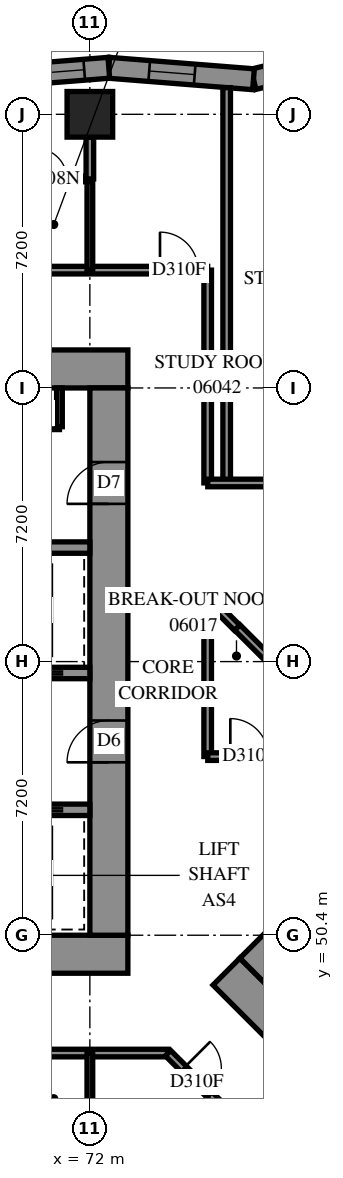
"""IFC4 building model, lengths in metres.
Left out: names, types, materials, properties, quantities, classifications, styles, units other than length and angle.
Written with IfcOpenShell. Run it as: python <this file> out.ifc"""

import sys

from ifc_helpers import new_model, si_unit, direction, frame, frame_2d, origin, origin_2d, place, context, subcontext, project, spatial, polyline, rectangle, outline, extrude, element, fill, save


model = new_model("IFC4")
c1 = context("Model", 3, precision=1e-05, world=origin(), true_north=direction((0.0, 1.0)))
c2 = subcontext(c1, "Body", "Model", "MODEL_VIEW")
j1 = project(units=[si_unit("LENGTHUNIT", "METRE"), si_unit("PLANEANGLEUNIT", "RADIAN")], contexts=[c1])
p1 = place(None, origin())
s1 = spatial("IfcSite", under=j1, at=p1, CompositionType="ELEMENT")
p2 = place(p1, origin())
s2 = spatial("IfcBuilding", under=s1, at=p2, CompositionType="ELEMENT")
p3 = place(p2, frame((0.0, 0.0, 27.0)))
s3 = spatial("IfcBuildingStorey", under=s2, at=p3, CompositionType="ELEMENT", Elevation=27.0)
p4 = place(p3, frame((72.0, 72.0, 0.0), z_axis=(0.0, 0.0, 1.0), x_axis=(1.0, 0.0, 0.0)))
e1 = element("IfcColumn", 1, at=p4, inside=s3, PredefinedType="COLUMN", context=c2, shape_type="SweptSolid", body=[
    extrude(rectangle(XDim=1.2, YDim=1.2, at=origin_2d()), origin(), (0.0, 0.0, 1.0), 3.1),
])
p5 = place(p3, frame((56.6, 49.9, -0.3), z_axis=(0.0, 0.0, 1.0), x_axis=(1.0, 0.0, 0.0)))
e2 = element("IfcWall", 2, at=p5, inside=s3, PredefinedType="SHEAR", context=c2, shape_type="SweptSolid", body=[
    extrude(rectangle(XDim=16.4, YDim=1.0, at=frame_2d((8.2, 0.0))), origin(), (0.0, 0.0, 1.0), 2.7),
])
p6 = place(p3, frame((56.6, 65.3, -0.3), z_axis=(0.0, 0.0, 1.0), x_axis=(1.0, 0.0, 0.0)))
e3 = element("IfcWall", 3, at=p6, inside=s3, PredefinedType="SHEAR", context=c2, shape_type="SweptSolid", body=[
    extrude(rectangle(XDim=16.4, YDim=1.0, at=frame_2d((8.2, 0.0))), origin(), (0.0, 0.0, 1.0), 2.7),
])
p7 = place(p6, frame((11.0, 0.0, 0.3)))
e4 = element("IfcOpeningElement", 4, at=p7, cuts=e3, PredefinedType="OPENING", context=c2, shape_type="SweptSolid", body=[
    extrude(rectangle(XDim=0.8, YDim=2.1, at=frame_2d((0.4, 1.05))), frame((0.0, 0.51, 0.0), z_axis=(0.0, -1.0, 0.0), x_axis=(1.0, 0.0, 0.0)), (0.0, 0.0, 1.0), 1.02),
])
p8 = place(p3, frame((72.5, 50.4, -0.3), z_axis=(0.0, 0.0, 1.0), x_axis=(0.0, 1.0, 0.0)))
e5 = element("IfcWall", 5, at=p8, inside=s3, PredefinedType="SHEAR", context=c2, shape_type="SweptSolid", body=[
    extrude(rectangle(XDim=14.4, YDim=1.0, at=frame_2d((7.2, 0.0))), origin(), (0.0, 0.0, 1.0), 2.7),
])
p9 = place(p8, frame((4.55, 0.0, 0.3)))
e6 = element("IfcOpeningElement", 6, at=p9, cuts=e5, PredefinedType="OPENING", context=c2, shape_type="SweptSolid", body=[
    extrude(rectangle(XDim=1.1, YDim=2.1, at=frame_2d((0.55, 1.05))), frame((0.0, 0.51, 0.0), z_axis=(0.0, -1.0, 0.0), x_axis=(1.0, 0.0, 0.0)), (0.0, 0.0, 1.0), 1.02),
])
p10 = place(p8, frame((11.35, 0.0, 0.3)))
e7 = element("IfcOpeningElement", 7, at=p10, cuts=e5, PredefinedType="OPENING", context=c2, shape_type="SweptSolid", body=[
    extrude(rectangle(XDim=1.1, YDim=2.1, at=frame_2d((0.55, 1.05))), frame((0.0, 0.51, 0.0), z_axis=(0.0, -1.0, 0.0), x_axis=(1.0, 0.0, 0.0)), (0.0, 0.0, 1.0), 1.02),
])
p11 = place(p3, frame((57.6, 53.7, 0.0), z_axis=(0.0, 0.0, 1.0), x_axis=(1.0, 0.0, 0.0)))
e8 = element("IfcWall", 8, at=p11, inside=s3, PredefinedType="SOLIDWALL", context=c2, shape_type="SweptSolid", body=[
    extrude(rectangle(XDim=14.4, YDim=0.3, at=frame_2d((7.2, 0.0))), origin(), (0.0, 0.0, 1.0), 3.1),
])
p12 = place(p11, frame((1.25, 0.0, 0.0)))
e9 = element("IfcOpeningElement", 9, at=p12, cuts=e8, PredefinedType="OPENING", context=c2, shape_type="SweptSolid", body=[
    extrude(rectangle(XDim=1.1, YDim=2.1, at=frame_2d((0.55, 1.05))), frame((0.0, 0.16, 0.0), z_axis=(0.0, -1.0, 0.0), x_axis=(1.0, 0.0, 0.0)), (0.0, 0.0, 1.0), 0.32),
])
p13 = place(p11, frame((4.85, 0.0, 0.0)))
e10 = element("IfcOpeningElement", 10, at=p13, cuts=e8, PredefinedType="OPENING", context=c2, shape_type="SweptSolid", body=[
    extrude(rectangle(XDim=1.1, YDim=2.1, at=frame_2d((0.55, 1.05))), frame((0.0, 0.16, 0.0), z_axis=(0.0, -1.0, 0.0), x_axis=(1.0, 0.0, 0.0)), (0.0, 0.0, 1.0), 0.32),
])
p14 = place(p11, frame((8.45, 0.0, 0.0)))
e11 = element("IfcOpeningElement", 11, at=p14, cuts=e8, PredefinedType="OPENING", context=c2, shape_type="SweptSolid", body=[
    extrude(rectangle(XDim=1.1, YDim=2.1, at=frame_2d((0.55, 1.05))), frame((0.0, 0.16, 0.0), z_axis=(0.0, -1.0, 0.0), x_axis=(1.0, 0.0, 0.0)), (0.0, 0.0, 1.0), 0.32),
])
p15 = place(p11, frame((12.05, 0.0, 0.0)))
e12 = element("IfcOpeningElement", 12, at=p15, cuts=e8, PredefinedType="OPENING", context=c2, shape_type="SweptSolid", body=[
    extrude(rectangle(XDim=1.1, YDim=2.1, at=frame_2d((0.55, 1.05))), frame((0.0, 0.16, 0.0), z_axis=(0.0, -1.0, 0.0), x_axis=(1.0, 0.0, 0.0)), (0.0, 0.0, 1.0), 0.32),
])
p16 = place(p3, frame((57.6, 57.3, 0.0), z_axis=(0.0, 0.0, 1.0), x_axis=(1.0, 0.0, 0.0)))
e13 = element("IfcWall", 13, at=p16, inside=s3, PredefinedType="SOLIDWALL", context=c2, shape_type="SweptSolid", body=[
    extrude(rectangle(XDim=14.4, YDim=0.3, at=frame_2d((7.2, 0.0))), origin(), (0.0, 0.0, 1.0), 3.1),
])
p17 = place(p16, frame((12.05, 0.0, 0.0)))
e14 = element("IfcOpeningElement", 14, at=p17, cuts=e13, PredefinedType="OPENING", context=c2, shape_type="SweptSolid", body=[
    extrude(rectangle(XDim=1.1, YDim=2.1, at=frame_2d((0.55, 1.05))), frame((0.0, 0.16, 0.0), z_axis=(0.0, -1.0, 0.0), x_axis=(1.0, 0.0, 0.0)), (0.0, 0.0, 1.0), 0.32),
])
p18 = place(p3, frame((64.8, 60.6, 0.0), z_axis=(0.0, 0.0, 1.0), x_axis=(1.0, 0.0, 0.0)))
e15 = element("IfcWall", 15, at=p18, inside=s3, PredefinedType="SOLIDWALL", context=c2, shape_type="SweptSolid", body=[
    extrude(rectangle(XDim=7.2, YDim=0.3, at=frame_2d((3.6, 0.0))), origin(), (0.0, 0.0, 1.0), 3.1),
])
p19 = place(p3, frame((75.594, 49.443, -0.3), z_axis=(0.0, 0.0, 1.0), x_axis=(0.7071037324, -0.70710983, 0.0)))
e16 = element("IfcWall", 16, at=p19, inside=s3, PredefinedType="SHEAR", context=c2, shape_type="SweptSolid", body=[
    extrude(rectangle(XDim=16.4, YDim=1.0, at=frame_2d((8.2, 0.0))), origin(), (0.0, 0.0, 1.0), 2.7),
])
p20 = place(p3, frame((76.301, 49.443, -0.3), z_axis=(0.0, 0.0, 1.0), x_axis=(0.7071067812, 0.7071067812, 0.0)))
e17 = element("IfcWall", 17, at=p20, inside=s3, PredefinedType="SHEAR", context=c2, shape_type="SweptSolid", body=[
    extrude(rectangle(XDim=14.4, YDim=1.0, at=frame_2d((7.2, 0.0))), origin(), (0.0, 0.0, 1.0), 2.7),
])
p21 = place(p20, frame((4.55, 0.0, 0.3)))
e18 = element("IfcOpeningElement", 18, at=p21, cuts=e17, PredefinedType="OPENING", context=c2, shape_type="SweptSolid", body=[
    extrude(rectangle(XDim=1.1, YDim=2.1, at=frame_2d((0.55, 1.05))), frame((0.0, 0.51, 0.0), z_axis=(0.0, -1.0, 0.0), x_axis=(1.0, 0.0, 0.0)), (0.0, 0.0, 1.0), 1.02),
])
p22 = place(p20, frame((11.35, 0.0, 0.3)))
e19 = element("IfcOpeningElement", 19, at=p22, cuts=e17, PredefinedType="OPENING", context=c2, shape_type="SweptSolid", body=[
    extrude(rectangle(XDim=1.1, YDim=2.1, at=frame_2d((0.55, 1.05))), frame((0.0, 0.51, 0.0), z_axis=(0.0, -1.0, 0.0), x_axis=(1.0, 0.0, 0.0)), (0.0, 0.0, 1.0), 1.02),
])
p23 = place(p3, frame((79.935, 73.785, 0.0), z_axis=(0.0, 0.0, 1.0), x_axis=(-0.9728826648, -0.2312992014, 0.0)))
e20 = element("IfcWall", 20, at=p23, inside=s3, PredefinedType="SOLIDWALL", context=c2, shape_type="SweptSolid", body=[
    extrude(outline(polyline([(-0.204, -0.275), (3.687, -0.275), (3.774, 0.275), (0.204, 0.275), (-0.204, -0.275)])), origin(), (0.0, 0.0, 1.0), 3.1),
])
p24 = place(p23, frame((1.543, 0.0, 0.5)))
e21 = element("IfcOpeningElement", 21, at=p24, cuts=e20, PredefinedType="OPENING", context=c2, shape_type="SweptSolid", body=[
    extrude(rectangle(XDim=1.2, YDim=2.45, at=frame_2d((0.6, 1.225))), frame((0.0, 0.285, 0.0), z_axis=(0.0, -1.0, 0.0), x_axis=(1.0, 0.0, 0.0)), (0.0, 0.0, 1.0), 0.57),
])
p25 = place(p3, frame((76.306, 72.922, 0.0), z_axis=(0.0, 0.0, 1.0), x_axis=(-0.9968745318, 0.0790010628, 0.0)))
e22 = element("IfcWall", 22, at=p25, inside=s3, PredefinedType="SOLIDWALL", context=c2, shape_type="SweptSolid", body=[
    extrude(outline(polyline([(0.043, -0.275), (3.841, -0.275), (3.797, 0.275), (-0.043, 0.275), (0.043, -0.275)])), origin(), (0.0, 0.0, 1.0), 3.1),
])
p26 = place(p25, frame((1.553, 0.0, 0.5)))
e23 = element("IfcOpeningElement", 23, at=p26, cuts=e22, PredefinedType="OPENING", context=c2, shape_type="SweptSolid", body=[
    extrude(rectangle(XDim=1.2, YDim=2.45, at=frame_2d((0.6, 1.225))), frame((0.0, 0.285, 0.0), z_axis=(0.0, -1.0, 0.0), x_axis=(1.0, 0.0, 0.0)), (0.0, 0.0, 1.0), 0.57),
])
p27 = place(p3, frame((72.499, 73.224, 0.0), z_axis=(0.0, 0.0, 1.0), x_axis=(-0.9968747806, -0.0789979222, 0.0)))
e24 = element("IfcWall", 24, at=p27, inside=s3, PredefinedType="SOLIDWALL", context=c2, shape_type="SweptSolid", body=[
    extrude(outline(polyline([(-0.022, -0.275), (3.776, -0.275), (3.819, 0.275), (0.022, 0.275), (-0.022, -0.275)])), origin(), (0.0, 0.0, 1.0), 3.1),
])
p28 = place(p27, frame((0.649, 0.0, 0.5)))
e25 = element("IfcOpeningElement", 25, at=p28, cuts=e24, PredefinedType="OPENING", context=c2, shape_type="SweptSolid", body=[
    extrude(rectangle(XDim=2.8, YDim=2.45, at=frame_2d((1.4, 1.225))), frame((0.0, 0.285, 0.0), z_axis=(0.0, -1.0, 0.0), x_axis=(1.0, 0.0, 0.0)), (0.0, 0.0, 1.0), 0.57),
])
p29 = place(p3, frame((64.95, 63.78, 0.0), z_axis=(0.0, 0.0, 1.0), x_axis=(1.0, 0.0, 0.0)))
e26 = element("IfcWall", 26, at=p29, inside=s3, PredefinedType="PARTITIONING", context=c2, shape_type="SweptSolid", body=[
    extrude(rectangle(XDim=6.25, YDim=0.15, at=frame_2d((3.125, 0.0))), origin(), (0.0, 0.0, 1.0), 3.1),
])
p30 = place(p3, frame((71.2, 63.78, 0.0), z_axis=(0.0, 0.0, 1.0), x_axis=(0.0, 1.0, 0.0)))
e27 = element("IfcWall", 27, at=p30, inside=s3, PredefinedType="PARTITIONING", context=c2, shape_type="SweptSolid", body=[
    extrude(rectangle(XDim=1.02, YDim=0.15, at=frame_2d((0.51, 0.0))), origin(), (0.0, 0.0, 1.0), 3.1),
])
p31 = place(p3, frame((54.5, 67.9, 0.0), z_axis=(0.0, 0.0, 1.0), x_axis=(1.0, 0.0, 0.0)))
e28 = element("IfcWall", 28, at=p31, inside=s3, PredefinedType="PARTITIONING", context=c2, shape_type="SweptSolid", body=[
    extrude(rectangle(XDim=20.6, YDim=0.2, at=frame_2d((10.3, 0.0))), origin(), (0.0, 0.0, 1.0), 3.1),
])
p32 = place(p31, frame((0.255, 0.0, 0.0)))
e29 = element("IfcOpeningElement", 29, at=p32, cuts=e28, PredefinedType="OPENING", context=c2, shape_type="SweptSolid", body=[
    extrude(rectangle(XDim=1.0, YDim=2.1, at=frame_2d((0.5, 1.05))), frame((0.0, 0.11, 0.0), z_axis=(0.0, -1.0, 0.0), x_axis=(1.0, 0.0, 0.0)), (0.0, 0.0, 1.0), 0.22),
])
p33 = place(p31, frame((19.345, 0.0, 0.0)))
e30 = element("IfcOpeningElement", 30, at=p33, cuts=e28, PredefinedType="OPENING", context=c2, shape_type="SweptSolid", body=[
    extrude(rectangle(XDim=1.0, YDim=2.1, at=frame_2d((0.5, 1.05))), frame((0.0, 0.11, 0.0), z_axis=(0.0, -1.0, 0.0), x_axis=(1.0, 0.0, 0.0)), (0.0, 0.0, 1.0), 0.22),
])
p34 = place(p31, frame((5.45, 0.0, 0.0)))
e31 = element("IfcOpeningElement", 31, at=p34, cuts=e28, PredefinedType="OPENING", context=c2, shape_type="SweptSolid", body=[
    extrude(rectangle(XDim=0.9, YDim=2.1, at=frame_2d((0.45, 1.05))), frame((0.0, 0.11, 0.0), z_axis=(0.0, -1.0, 0.0), x_axis=(1.0, 0.0, 0.0)), (0.0, 0.0, 1.0), 0.22),
])
p35 = place(p31, frame((7.1, 0.0, 0.0)))
e32 = element("IfcOpeningElement", 32, at=p35, cuts=e28, PredefinedType="OPENING", context=c2, shape_type="SweptSolid", body=[
    extrude(rectangle(XDim=0.9, YDim=2.1, at=frame_2d((0.45, 1.05))), frame((0.0, 0.11, 0.0), z_axis=(0.0, -1.0, 0.0), x_axis=(1.0, 0.0, 0.0)), (0.0, 0.0, 1.0), 0.22),
])
p36 = place(p31, frame((12.65, 0.0, 0.0)))
e33 = element("IfcOpeningElement", 33, at=p36, cuts=e28, PredefinedType="OPENING", context=c2, shape_type="SweptSolid", body=[
    extrude(rectangle(XDim=0.9, YDim=2.1, at=frame_2d((0.45, 1.05))), frame((0.0, 0.11, 0.0), z_axis=(0.0, -1.0, 0.0), x_axis=(1.0, 0.0, 0.0)), (0.0, 0.0, 1.0), 0.22),
])
p37 = place(p31, frame((14.3, 0.0, 0.0)))
e34 = element("IfcOpeningElement", 34, at=p37, cuts=e28, PredefinedType="OPENING", context=c2, shape_type="SweptSolid", body=[
    extrude(rectangle(XDim=0.9, YDim=2.1, at=frame_2d((0.45, 1.05))), frame((0.0, 0.11, 0.0), z_axis=(0.0, -1.0, 0.0), x_axis=(1.0, 0.0, 0.0)), (0.0, 0.0, 1.0), 0.22),
])
p38 = place(p3, frame((54.5, 47.3, 0.0), z_axis=(0.0, 0.0, 1.0), x_axis=(1.0, 0.0, 0.0)))
e35 = element("IfcWall", 35, at=p38, inside=s3, PredefinedType="PARTITIONING", context=c2, shape_type="SweptSolid", body=[
    extrude(rectangle(XDim=19.56, YDim=0.2, at=frame_2d((9.78, 0.0))), origin(), (0.0, 0.0, 1.0), 3.1),
])
p39 = place(p38, frame((0.243, 0.0, 0.0)))
e36 = element("IfcOpeningElement", 36, at=p39, cuts=e35, PredefinedType="OPENING", context=c2, shape_type="SweptSolid", body=[
    extrude(rectangle(XDim=1.0, YDim=2.1, at=frame_2d((0.5, 1.05))), frame((0.0, 0.11, 0.0), z_axis=(0.0, -1.0, 0.0), x_axis=(1.0, 0.0, 0.0)), (0.0, 0.0, 1.0), 0.22),
])
p40 = place(p38, frame((5.4, 0.0, 0.0)))
e37 = element("IfcOpeningElement", 37, at=p40, cuts=e35, PredefinedType="OPENING", context=c2, shape_type="SweptSolid", body=[
    extrude(rectangle(XDim=0.9, YDim=2.1, at=frame_2d((0.45, 1.05))), frame((0.0, 0.11, 0.0), z_axis=(0.0, -1.0, 0.0), x_axis=(1.0, 0.0, 0.0)), (0.0, 0.0, 1.0), 0.22),
])
p41 = place(p38, frame((7.1, 0.0, 0.0)))
e38 = element("IfcOpeningElement", 38, at=p41, cuts=e35, PredefinedType="OPENING", context=c2, shape_type="SweptSolid", body=[
    extrude(rectangle(XDim=0.9, YDim=2.1, at=frame_2d((0.45, 1.05))), frame((0.0, 0.11, 0.0), z_axis=(0.0, -1.0, 0.0), x_axis=(1.0, 0.0, 0.0)), (0.0, 0.0, 1.0), 0.22),
])
p42 = place(p38, frame((12.6, 0.0, 0.0)))
e39 = element("IfcOpeningElement", 39, at=p42, cuts=e35, PredefinedType="OPENING", context=c2, shape_type="SweptSolid", body=[
    extrude(rectangle(XDim=0.9, YDim=2.1, at=frame_2d((0.45, 1.05))), frame((0.0, 0.11, 0.0), z_axis=(0.0, -1.0, 0.0), x_axis=(1.0, 0.0, 0.0)), (0.0, 0.0, 1.0), 0.22),
])
p43 = place(p38, frame((14.3, 0.0, 0.0)))
e40 = element("IfcOpeningElement", 40, at=p43, cuts=e35, PredefinedType="OPENING", context=c2, shape_type="SweptSolid", body=[
    extrude(rectangle(XDim=0.9, YDim=2.1, at=frame_2d((0.45, 1.05))), frame((0.0, 0.11, 0.0), z_axis=(0.0, -1.0, 0.0), x_axis=(1.0, 0.0, 0.0)), (0.0, 0.0, 1.0), 0.22),
])
p44 = place(p3, frame((75.6, 62.3, 0.0), z_axis=(0.0, 0.0, 1.0), x_axis=(0.0, 1.0, 0.0)))
e41 = element("IfcWall", 41, at=p44, inside=s3, PredefinedType="PARTITIONING", context=c2, shape_type="SweptSolid", body=[
    extrude(rectangle(XDim=10.402, YDim=0.2, at=frame_2d((5.201, 0.0))), origin(), (0.0, 0.0, 1.0), 3.1),
])
p45 = place(p3, frame((75.1, 62.302, 0.0), z_axis=(0.0, 0.0, 1.0), x_axis=(0.0, 1.0, 0.0)))
e42 = element("IfcWall", 42, at=p45, inside=s3, PredefinedType="PARTITIONING", context=c2, shape_type="SweptSolid", body=[
    extrude(rectangle(XDim=5.598, YDim=0.2, at=frame_2d((2.799, 0.0))), origin(), (0.0, 0.0, 1.0), 3.1),
])
p46 = place(p3, frame((74.057, 47.297, 0.0), z_axis=(0.0, 0.0, 1.0), x_axis=(0.7071067812, -0.7071067812, 0.0)))
e43 = element("IfcWall", 43, at=p46, inside=s3, PredefinedType="PARTITIONING", context=c2, shape_type="SweptSolid", body=[
    extrude(rectangle(XDim=4.653, YDim=0.2, at=frame_2d((2.326, 0.0))), origin(), (0.0, 0.0, 1.0), 3.1),
])
p47 = place(p46, frame((0.57, 0.0, 0.0)))
e44 = element("IfcOpeningElement", 44, at=p47, cuts=e43, PredefinedType="OPENING", context=c2, shape_type="SweptSolid", body=[
    extrude(rectangle(XDim=1.0, YDim=2.1, at=frame_2d((0.5, 1.05))), frame((0.0, 0.11, 0.0), z_axis=(0.0, -1.0, 0.0), x_axis=(1.0, 0.0, 0.0)), (0.0, 0.0, 1.0), 0.22),
])
p48 = place(p3, frame((75.1, 55.102, 0.0), z_axis=(0.0, 0.0, 1.0), x_axis=(0.0, 1.0, 0.0)))
e45 = element("IfcWall", 45, at=p48, inside=s3, PredefinedType="PARTITIONING", context=c2, shape_type="SweptSolid", body=[
    extrude(rectangle(XDim=4.166, YDim=0.2, at=frame_2d((2.083, 0.0))), origin(), (0.0, 0.0, 1.0), 3.1),
])
p49 = place(p3, frame((75.102, 62.3, 0.0), z_axis=(0.0, 0.0, 1.0), x_axis=(1.0, 0.0, 0.0)))
e46 = element("IfcWall", 46, at=p49, inside=s3, PredefinedType="PARTITIONING", context=c2, shape_type="SweptSolid", body=[
    extrude(rectangle(XDim=4.098, YDim=0.2, at=frame_2d((2.049, 0.0))), origin(), (0.0, 0.0, 1.0), 3.1),
])
p50 = place(p3, frame((75.102, 55.1, 0.0), z_axis=(0.0, 0.0, 1.0), x_axis=(1.0, 0.0, 0.0)))
e47 = element("IfcWall", 47, at=p50, inside=s3, PredefinedType="PARTITIONING", context=c2, shape_type="SweptSolid", body=[
    extrude(rectangle(XDim=3.178, YDim=0.2, at=frame_2d((1.589, 0.0))), origin(), (0.0, 0.0, 1.0), 3.1),
])
p51 = place(p50, frame((0.594, 0.0, 0.0)))
e48 = element("IfcOpeningElement", 48, at=p51, cuts=e47, PredefinedType="OPENING", context=c2, shape_type="SweptSolid", body=[
    extrude(rectangle(XDim=1.0, YDim=2.1, at=frame_2d((0.5, 1.05))), frame((0.0, 0.11, 0.0), z_axis=(0.0, -1.0, 0.0), x_axis=(1.0, 0.0, 0.0)), (0.0, 0.0, 1.0), 0.22),
])
for number, where, z_axis, x_axis in (
    (49, (72.0, 44.9, 0.0), (0.0, 0.0, 1.0), (0.0, 1.0, 0.0)),
    (50, (72.0, 67.9, 0.0), (0.0, 0.0, 1.0), (0.0, 1.0, 0.0)),
):
    element("IfcWall", number, at=place(p3, frame(where, z_axis=z_axis, x_axis=x_axis)), inside=s3, PredefinedType="PARTITIONING", context=c2, shape_type="SweptSolid", body=[
        extrude(rectangle(XDim=2.4, YDim=0.15, at=frame_2d((1.2, 0.0))), origin(), (0.0, 0.0, 1.0), 3.1),
    ])
p52 = place(p3, frame((75.879, 58.497, 0.0), z_axis=(0.0, 0.0, 1.0), x_axis=(0.7075866635, -0.706626573, 0.0)))
e51 = element("IfcWall", 51, at=p52, inside=s3, PredefinedType="PARTITIONING", context=c2, shape_type="SweptSolid", body=[
    extrude(rectangle(XDim=2.083, YDim=0.2, at=frame_2d((1.042, 0.0))), origin(), (0.0, 0.0, 1.0), 3.1),
])
p53 = place(p3, frame((70.1, 70.3, 0.0), z_axis=(0.0, 0.0, 1.0), x_axis=(1.0, 0.0, 0.0)))
e52 = element("IfcWall", 52, at=p53, inside=s3, PredefinedType="PARTITIONING", context=c2, shape_type="SweptSolid", body=[
    extrude(rectangle(XDim=1.9, YDim=0.15, at=frame_2d((0.95, 0.0))), origin(), (0.0, 0.0, 1.0), 3.1),
])
p54 = place(p53, frame((0.493, 0.0, 0.0)))
e53 = element("IfcOpeningElement", 53, at=p54, cuts=e52, PredefinedType="OPENING", context=c2, shape_type="SweptSolid", body=[
    extrude(rectangle(XDim=0.8, YDim=2.1, at=frame_2d((0.4, 1.05))), frame((0.0, 0.085, 0.0), z_axis=(0.0, -1.0, 0.0), x_axis=(1.0, 0.0, 0.0)), (0.0, 0.0, 1.0), 0.17),
])
p55 = place(p3, frame((72.0, 70.3, 0.0), z_axis=(0.0, 0.0, 1.0), x_axis=(0.0, 1.0, 0.0)))
e54 = element("IfcWall", 54, at=p55, inside=s3, PredefinedType="PARTITIONING", context=c2, shape_type="SweptSolid", body=[
    extrude(rectangle(XDim=1.1, YDim=0.2, at=frame_2d((0.55, 0.0))), origin(), (0.0, 0.0, 1.0), 3.1),
])
p56 = place(p3, frame((75.297, 59.067, 0.0), z_axis=(0.0, 0.0, 1.0), x_axis=(0.7071067812, -0.7071067812, 0.0)))
e55 = element("IfcWall", 55, at=p56, inside=s3, PredefinedType="PARTITIONING", context=c2, shape_type="SweptSolid", body=[
    extrude(rectangle(XDim=0.815, YDim=0.2, at=frame_2d((0.407, 0.0))), origin(), (0.0, 0.0, 1.0), 3.1),
])
p57 = place(p26, origin())
e56 = element("IfcWindow", 56, at=p57, inside=s3, PartitioningType="SINGLE_PANEL", PredefinedType="WINDOW", context=c2, shape_type="SweptSolid", body=[
    extrude(rectangle(XDim=1.2, YDim=2.45, at=frame_2d((0.6, 1.225))), frame((0.0, 0.155, 0.0), z_axis=(0.0, -1.0, 0.0), x_axis=(1.0, 0.0, 0.0)), (0.0, 0.0, 1.0), 0.06),
])
fill(e23, e56)
p58 = place(p28, origin())
e57 = element("IfcWindow", 57, at=p58, inside=s3, PartitioningType="SINGLE_PANEL", PredefinedType="WINDOW", context=c2, shape_type="SweptSolid", body=[
    extrude(rectangle(XDim=2.8, YDim=2.45, at=frame_2d((1.4, 1.225))), frame((0.0, 0.155, 0.0), z_axis=(0.0, -1.0, 0.0), x_axis=(1.0, 0.0, 0.0)), (0.0, 0.0, 1.0), 0.06),
])
fill(e25, e57)
p59 = place(p9, origin())
e58 = element("IfcDoor", 58, at=p59, inside=s3, OperationType="DOUBLE_DOOR_SINGLE_SWING", PredefinedType="DOOR", context=c2, shape_type="SweptSolid", body=[
    extrude(rectangle(XDim=1.1, YDim=2.1, at=frame_2d((0.55, 1.05))), frame((0.0, 0.025, 0.0), z_axis=(0.0, -1.0, 0.0), x_axis=(1.0, 0.0, 0.0)), (0.0, 0.0, 1.0), 0.05),
])
fill(e6, e58)
p60 = place(p10, origin())
e59 = element("IfcDoor", 59, at=p60, inside=s3, OperationType="SINGLE_SWING_RIGHT", PredefinedType="DOOR", context=c2, shape_type="SweptSolid", body=[
    extrude(rectangle(XDim=1.1, YDim=2.1, at=frame_2d((0.55, 1.05))), frame((0.0, 0.025, 0.0), z_axis=(0.0, -1.0, 0.0), x_axis=(1.0, 0.0, 0.0)), (0.0, 0.0, 1.0), 0.05),
])
fill(e7, e59)
p61 = place(p51, origin())
e60 = element("IfcDoor", 60, at=p61, inside=s3, OperationType="SINGLE_SWING_LEFT", PredefinedType="DOOR", context=c2, shape_type="SweptSolid", body=[
    extrude(rectangle(XDim=1.0, YDim=2.1, at=frame_2d((0.5, 1.05))), frame((0.0, 0.025, 0.0), z_axis=(0.0, -1.0, 0.0), x_axis=(1.0, 0.0, 0.0)), (0.0, 0.0, 1.0), 0.05),
])
fill(e48, e60)
p62 = place(p33, origin())
e61 = element("IfcDoor", 61, at=p62, inside=s3, OperationType="SINGLE_SWING_RIGHT", PredefinedType="DOOR", context=c2, shape_type="SweptSolid", body=[
    extrude(rectangle(XDim=1.0, YDim=2.1, at=frame_2d((0.5, 1.05))), frame((0.0, 0.025, 0.0), z_axis=(0.0, -1.0, 0.0), x_axis=(1.0, 0.0, 0.0)), (0.0, 0.0, 1.0), 0.05),
])
fill(e30, e61)
p63 = place(p54, origin())
e62 = element("IfcDoor", 62, at=p63, inside=s3, OperationType="SINGLE_SWING_RIGHT", PredefinedType="DOOR", context=c2, shape_type="SweptSolid", body=[
    extrude(rectangle(XDim=0.8, YDim=2.1, at=frame_2d((0.4, 1.05))), frame((0.0, 0.025, 0.0), z_axis=(0.0, -1.0, 0.0), x_axis=(1.0, 0.0, 0.0)), (0.0, 0.0, 1.0), 0.05),
])
fill(e53, e62)
p64 = place(p47, origin())
e63 = element("IfcDoor", 63, at=p64, inside=s3, OperationType="SINGLE_SWING_LEFT", PredefinedType="DOOR", context=c2, shape_type="SweptSolid", body=[
    extrude(rectangle(XDim=1.0, YDim=2.1, at=frame_2d((0.5, 1.05))), frame((0.0, 0.025, 0.0), z_axis=(0.0, -1.0, 0.0), x_axis=(1.0, 0.0, 0.0)), (0.0, 0.0, 1.0), 0.05),
])
fill(e44, e63)
save(model, sys.argv[1])
